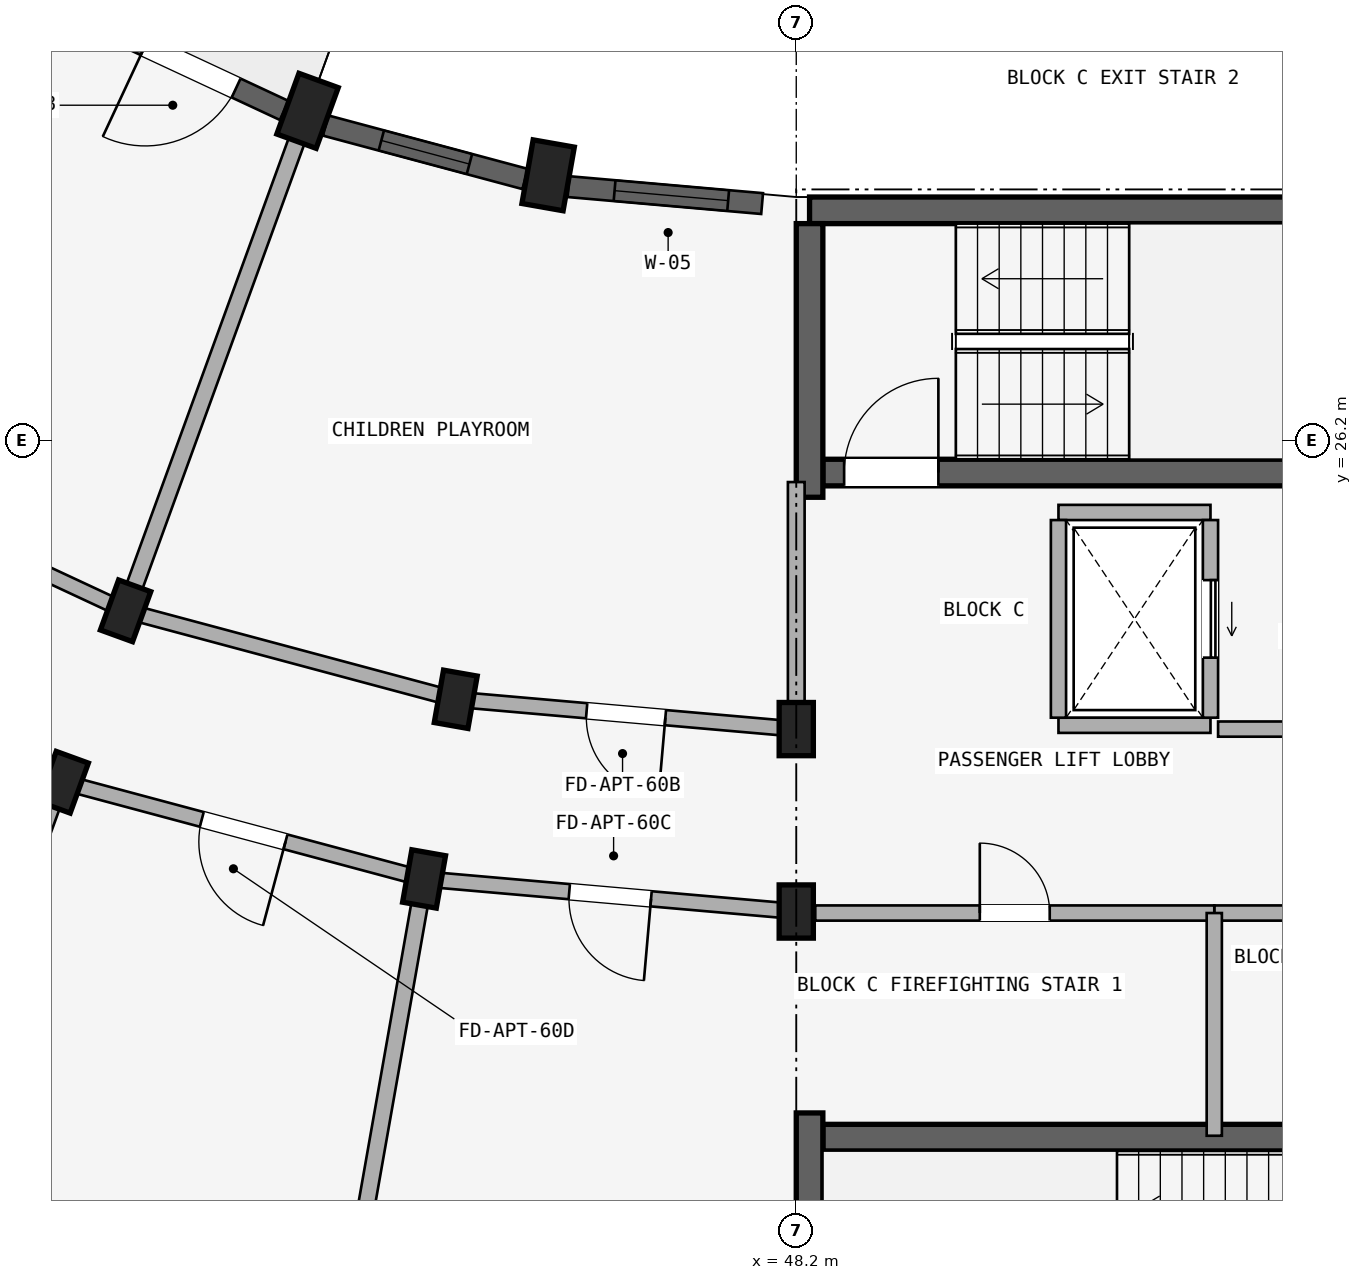
"""IFC4 building model, lengths in metres.
Left out: names, types, materials, properties, quantities, classifications, styles, units other than length and angle.
Written with IfcOpenShell. Run it as: python <this file> out.ifc"""

import sys

from ifc_helpers import new_model, si_unit, direction, frame, frame_2d, origin, origin_2d, place, context, subcontext, project, spatial, rectangle, extrude, element, fill, save


model = new_model("IFC4")
c1 = context("Model", 3, precision=1e-05, world=origin(), true_north=direction((0.0, 1.0)))
c2 = subcontext(c1, "Body", "Model", "MODEL_VIEW")
j1 = project(units=[si_unit("LENGTHUNIT", "METRE"), si_unit("PLANEANGLEUNIT", "RADIAN")], contexts=[c1])
p1 = place(None, origin())
s1 = spatial("IfcSite", under=j1, at=p1, CompositionType="ELEMENT")
p2 = place(p1, origin())
s2 = spatial("IfcBuilding", under=s1, at=p2, CompositionType="ELEMENT")
p3 = place(p2, frame((0.0, 0.0, 15.0)))
s3 = spatial("IfcBuildingStorey", under=s2, at=p3, CompositionType="ELEMENT", Elevation=15.0)
p4 = place(p3, frame((48.55, 17.025, 0.0), z_axis=(0.0, 0.0, 1.0), x_axis=(1.0, 0.0, 0.0)))
e1 = element("IfcWall", 1, at=p4, inside=s3, PredefinedType="SHEAR", context=c2, shape_type="SweptSolid", body=[
    extrude(rectangle(XDim=8.075, YDim=0.35, at=frame_2d((4.038, 0.0))), origin(), (0.0, 0.0, 1.0), 2.93),
])
p5 = place(p4, frame((6.38, 0.0, 0.0)))
e2 = element("IfcOpeningElement", 2, at=p5, cuts=e1, PredefinedType="OPENING", context=c2, shape_type="SweptSolid", body=[
    extrude(rectangle(XDim=1.24, YDim=2.15, at=frame_2d((0.62, 1.075))), frame((0.0, 0.185, 0.0), z_axis=(0.0, -1.0, 0.0), x_axis=(1.0, 0.0, 0.0)), (0.0, 0.0, 1.0), 0.37),
])
p6 = place(p3, frame((48.375, 17.35, 0.0), z_axis=(0.0, 0.0, 1.0), x_axis=(0.0, -1.0, 0.0)))
e3 = element("IfcWall", 3, at=p6, inside=s3, PredefinedType="SHEAR", context=c2, shape_type="SweptSolid", body=[
    extrude(rectangle(XDim=3.6, YDim=0.35, at=frame_2d((1.8, 0.0))), origin(), (0.0, 0.0, 1.0), 2.93),
])
p7 = place(p3, frame((48.375, 29.225, 0.0), z_axis=(0.0, 0.0, 1.0), x_axis=(1.0, 0.0, 0.0)))
e4 = element("IfcWall", 4, at=p7, inside=s3, PredefinedType="SHEAR", context=c2, shape_type="SweptSolid", body=[
    extrude(rectangle(XDim=8.25, YDim=0.35, at=frame_2d((4.125, 0.0))), origin(), (0.0, 0.0, 1.0), 2.93),
])
p8 = place(p3, frame((48.55, 25.775, 0.0), z_axis=(0.0, 0.0, 1.0), x_axis=(1.0, 0.0, 0.0)))
e5 = element("IfcWall", 5, at=p8, inside=s3, PredefinedType="SHEAR", context=c2, shape_type="SweptSolid", body=[
    extrude(rectangle(XDim=7.9, YDim=0.35, at=frame_2d((3.95, 0.0))), origin(), (0.0, 0.0, 1.0), 2.93),
])
p9 = place(p8, frame((0.28, 0.0, 0.0)))
e6 = element("IfcOpeningElement", 6, at=p9, cuts=e5, PredefinedType="OPENING", context=c2, shape_type="SweptSolid", body=[
    extrude(rectangle(XDim=1.24, YDim=2.15, at=frame_2d((0.62, 1.075))), frame((0.0, 0.185, 0.0), z_axis=(0.0, -1.0, 0.0), x_axis=(1.0, 0.0, 0.0)), (0.0, 0.0, 1.0), 0.37),
])
p10 = place(p3, frame((48.375, 29.05, 0.0), z_axis=(0.0, 0.0, 1.0), x_axis=(0.0, -1.0, 0.0)))
e7 = element("IfcWall", 7, at=p10, inside=s3, PredefinedType="SHEAR", context=c2, shape_type="SweptSolid", body=[
    extrude(rectangle(XDim=3.6, YDim=0.35, at=frame_2d((1.8, 0.0))), origin(), (0.0, 0.0, 1.0), 2.93),
])
for number, where, z_axis, x_axis in (
    (8, (48.2, 22.4, 0.0), (0.0, 0.0, 1.0), (1.0, 0.0, 0.0)),
    (9, (48.2, 20.0, 0.0), (0.0, 0.0, 1.0), (1.0, 0.0, 0.0)),
):
    element("IfcColumn", number, at=place(p3, frame(where, z_axis=z_axis, x_axis=x_axis)), inside=s3, PredefinedType="COLUMN", context=c2, shape_type="SweptSolid", body=[
        extrude(rectangle(XDim=0.45, YDim=0.7, at=origin_2d()), origin(), (0.0, 0.0, 1.0), 2.93),
    ])
p11 = place(p3, frame((44.935, 29.686, 0.0), z_axis=(0.0, 0.0, 1.0), x_axis=(-0.984807753012, 0.173648177667, 0.0)))
e10 = element("IfcColumn", 10, at=p11, inside=s3, PredefinedType="COLUMN", context=c2, shape_type="SweptSolid", body=[
    extrude(rectangle(XDim=0.55, YDim=0.85, at=origin_2d()), origin(), (0.0, 0.0, 1.0), 2.93),
])
for number, where, z_axis, x_axis in (
    (11, (43.72, 22.792, 0.0), (0.0, 0.0, 1.0), (-0.985, 0.174, 0.0)),
    (12, (43.303, 20.428, 0.0), (0.0, 0.0, 1.0), (-0.985, 0.174, 0.0)),
):
    element("IfcColumn", number, at=place(p3, frame(where, z_axis=z_axis, x_axis=x_axis)), inside=s3, PredefinedType="COLUMN", context=c2, shape_type="SweptSolid", body=[
        extrude(rectangle(XDim=0.45, YDim=0.7, at=origin_2d()), origin(), (0.0, 0.0, 1.0), 2.93),
    ])
p12 = place(p3, frame((41.77, 30.534, 0.0), z_axis=(0.0, 0.0, 1.0), x_axis=(-0.939692620786, 0.342020143326, 0.0)))
e13 = element("IfcColumn", 13, at=p12, inside=s3, PredefinedType="COLUMN", context=c2, shape_type="SweptSolid", body=[
    extrude(rectangle(XDim=0.55, YDim=0.85, at=origin_2d()), origin(), (0.0, 0.0, 1.0), 2.93),
])
for number, where, z_axis, x_axis in (
    (14, (39.376, 23.956, 0.0), (0.0, 0.0, 1.0), (-0.94, 0.342, 0.0)),
    (15, (38.555, 21.701, 0.0), (0.0, 0.0, 1.0), (-0.94, 0.342, 0.0)),
):
    element("IfcColumn", number, at=place(p3, frame(where, z_axis=z_axis, x_axis=x_axis)), inside=s3, PredefinedType="COLUMN", context=c2, shape_type="SweptSolid", body=[
        extrude(rectangle(XDim=0.45, YDim=0.7, at=origin_2d()), origin(), (0.0, 0.0, 1.0), 2.93),
    ])
p13 = place(p3, frame((53.7, 19.98, 0.0), z_axis=(0.0, 0.0, 1.0), x_axis=(1.0, 0.0, 0.0)))
e16 = element("IfcWall", 16, at=p13, inside=s3, PredefinedType="STANDARD", context=c2, shape_type="SweptSolid", body=[
    extrude(rectangle(XDim=5.65, YDim=0.2, at=frame_2d((2.825, 0.0))), origin(), (0.0, 0.0, 1.0), 2.372),
])
p14 = place(p13, frame((1.923, 0.0, 0.0)))
e17 = element("IfcOpeningElement", 17, at=p14, cuts=e16, PredefinedType="OPENING", context=c2, shape_type="SweptSolid", body=[
    extrude(rectangle(XDim=1.24, YDim=2.15, at=frame_2d((0.62, 1.075))), frame((0.0, 0.11, 0.0), z_axis=(0.0, -1.0, 0.0), x_axis=(1.0, 0.0, 0.0)), (0.0, 0.0, 1.0), 0.22),
])
p15 = place(p3, frame((48.45, 19.98, 0.0), z_axis=(0.0, 0.0, 1.0), x_axis=(1.0, 0.0, 0.0)))
e18 = element("IfcWall", 18, at=p15, inside=s3, PredefinedType="STANDARD", context=c2, shape_type="SweptSolid", body=[
    extrude(rectangle(XDim=5.25, YDim=0.2, at=frame_2d((2.625, 0.0))), origin(), (0.0, 0.0, 1.0), 2.372),
])
p16 = place(p15, frame((2.165, 0.0, 0.0)))
e19 = element("IfcOpeningElement", 19, at=p16, cuts=e18, PredefinedType="OPENING", context=c2, shape_type="SweptSolid", body=[
    extrude(rectangle(XDim=0.92, YDim=2.1, at=frame_2d((0.46, 1.05))), frame((0.0, 0.11, 0.0), z_axis=(0.0, -1.0, 0.0), x_axis=(1.0, 0.0, 0.0)), (0.0, 0.0, 1.0), 0.22),
])
p17 = place(p3, frame((53.7, 19.98, 0.0), z_axis=(0.0, 0.0, 1.0), x_axis=(0.0, -1.0, 0.0)))
e20 = element("IfcWall", 20, at=p17, inside=s3, PredefinedType="STANDARD", context=c2, shape_type="SweptSolid", body=[
    extrude(rectangle(XDim=2.93, YDim=0.2, at=frame_2d((1.465, 0.0))), origin(), (0.0, 0.0, 1.0), 2.372),
])
p18 = place(p3, frame((51.65, 25.25, 0.0), z_axis=(0.0, 0.0, 1.0), x_axis=(1.0, 0.0, 0.0)))
e21 = element("IfcWall", 21, at=p18, inside=s3, PredefinedType="STANDARD", context=c2, shape_type="SweptSolid", body=[
    extrude(rectangle(XDim=2.0, YDim=0.2, at=frame_2d((1.0, 0.0))), origin(), (0.0, 0.0, 1.0), 2.93),
])
p19 = place(p3, frame((51.65, 22.45, 0.0), z_axis=(0.0, 0.0, 1.0), x_axis=(1.0, 0.0, 0.0)))
e22 = element("IfcWall", 22, at=p19, inside=s3, PredefinedType="STANDARD", context=c2, shape_type="SweptSolid", body=[
    extrude(rectangle(XDim=2.0, YDim=0.2, at=frame_2d((1.0, 0.0))), origin(), (0.0, 0.0, 1.0), 2.372),
])
p20 = place(p3, frame((51.65, 25.15, 0.0), z_axis=(0.0, 0.0, 1.0), x_axis=(0.0, -1.0, 0.0)))
e23 = element("IfcWall", 23, at=p20, inside=s3, PredefinedType="STANDARD", context=c2, shape_type="SweptSolid", body=[
    extrude(rectangle(XDim=2.6, YDim=0.2, at=frame_2d((1.3, 0.0))), origin(), (0.0, 0.0, 1.0), 2.372),
])
p21 = place(p3, frame((53.65, 25.15, 0.0), z_axis=(0.0, 0.0, 1.0), x_axis=(0.0, -1.0, 0.0)))
e24 = element("IfcWall", 24, at=p21, inside=s3, PredefinedType="STANDARD", context=c2, shape_type="SweptSolid", body=[
    extrude(rectangle(XDim=2.6, YDim=0.2, at=frame_2d((1.3, 0.0))), origin(), (0.0, 0.0, 1.0), 2.372),
])
p22 = place(p21, frame((0.79, 0.0, 0.0)))
e25 = element("IfcOpeningElement", 25, at=p22, cuts=e24, PredefinedType="OPENING", context=c2, shape_type="SweptSolid", body=[
    extrude(rectangle(XDim=1.02, YDim=2.15, at=frame_2d((0.51, 1.075))), frame((0.0, 0.11, 0.0), z_axis=(0.0, -1.0, 0.0), x_axis=(1.0, 0.0, 0.0)), (0.0, 0.0, 1.0), 0.22),
])
p23 = place(p3, frame((53.75, 22.4, 0.0), z_axis=(0.0, 0.0, 1.0), x_axis=(1.0, 0.0, 0.0)))
e26 = element("IfcWall", 26, at=p23, inside=s3, PredefinedType="STANDARD", context=c2, shape_type="SweptSolid", body=[
    extrude(rectangle(XDim=5.6, YDim=0.2, at=frame_2d((2.8, 0.0))), origin(), (0.0, 0.0, 1.0), 2.372),
])
p24 = place(p23, frame((1.91, 0.0, 0.0)))
e27 = element("IfcOpeningElement", 27, at=p24, cuts=e26, PredefinedType="OPENING", context=c2, shape_type="SweptSolid", body=[
    extrude(rectangle(XDim=1.22, YDim=2.15, at=frame_2d((0.61, 1.075))), frame((0.0, 0.11, 0.0), z_axis=(0.0, -1.0, 0.0), x_axis=(1.0, 0.0, 0.0)), (0.0, 0.0, 1.0), 0.22),
])
p25 = place(p3, frame((48.2, 22.4, 0.0), z_axis=(0.0, 0.0, 1.0), x_axis=(-0.996191949488, 0.087187153726, 0.0)))
e28 = element("IfcWall", 28, at=p25, inside=s3, PredefinedType="STANDARD", context=c2, shape_type="SweptSolid", body=[
    extrude(rectangle(XDim=4.497, YDim=0.2, at=frame_2d((2.249, 0.0))), origin(), (0.0, 0.0, 1.0), 2.372),
])
p26 = place(p25, frame((1.729, 0.0, 0.0)))
e29 = element("IfcOpeningElement", 29, at=p26, cuts=e28, PredefinedType="OPENING", context=c2, shape_type="SweptSolid", body=[
    extrude(rectangle(XDim=1.04, YDim=2.15, at=frame_2d((0.52, 1.075))), frame((0.0, 0.11, 0.0), z_axis=(0.0, -1.0, 0.0), x_axis=(1.0, 0.0, 0.0)), (0.0, 0.0, 1.0), 0.22),
])
p27 = place(p3, frame((48.2, 20.0, 0.0), z_axis=(0.0, 0.0, 1.0), x_axis=(-0.996193663584, 0.087167566415, 0.0)))
e30 = element("IfcWall", 30, at=p27, inside=s3, PredefinedType="STANDARD", context=c2, shape_type="SweptSolid", body=[
    extrude(rectangle(XDim=4.916, YDim=0.2, at=frame_2d((2.458, 0.0))), origin(), (0.0, 0.0, 1.0), 2.372),
])
p28 = place(p27, frame((1.918, 0.0, 0.0)))
e31 = element("IfcOpeningElement", 31, at=p28, cuts=e30, PredefinedType="OPENING", context=c2, shape_type="SweptSolid", body=[
    extrude(rectangle(XDim=1.08, YDim=2.15, at=frame_2d((0.54, 1.075))), frame((0.0, 0.11, 0.0), z_axis=(0.0, -1.0, 0.0), x_axis=(1.0, 0.0, 0.0)), (0.0, 0.0, 1.0), 0.22),
])
p29 = place(p3, frame((43.72, 22.792, 0.0), z_axis=(0.0, 0.0, 1.0), x_axis=(-0.965934240054, 0.258787642463, 0.0)))
e32 = element("IfcWall", 32, at=p29, inside=s3, PredefinedType="STANDARD", context=c2, shape_type="SweptSolid", body=[
    extrude(rectangle(XDim=4.497, YDim=0.2, at=frame_2d((2.249, 0.0))), origin(), (0.0, 0.0, 1.0), 2.372),
])
p30 = place(p3, frame((43.303, 20.428, 0.0), z_axis=(0.0, 0.0, 1.0), x_axis=(-0.965930095386, 0.258803112091, 0.0)))
e33 = element("IfcWall", 33, at=p30, inside=s3, PredefinedType="STANDARD", context=c2, shape_type="SweptSolid", body=[
    extrude(rectangle(XDim=4.916, YDim=0.2, at=frame_2d((2.458, 0.0))), origin(), (0.0, 0.0, 1.0), 2.372),
])
p31 = place(p30, frame((1.888, 0.0, 0.0)))
e34 = element("IfcOpeningElement", 34, at=p31, cuts=e33, PredefinedType="OPENING", context=c2, shape_type="SweptSolid", body=[
    extrude(rectangle(XDim=1.14, YDim=2.15, at=frame_2d((0.57, 1.075))), frame((0.0, 0.11, 0.0), z_axis=(0.0, -1.0, 0.0), x_axis=(1.0, 0.0, 0.0)), (0.0, 0.0, 1.0), 0.22),
])
p32 = place(p3, frame((39.376, 23.956, 0.0), z_axis=(0.0, 0.0, 1.0), x_axis=(-0.906307919131, 0.422617978463, 0.0)))
e35 = element("IfcWall", 35, at=p32, inside=s3, PredefinedType="STANDARD", context=c2, shape_type="SweptSolid", body=[
    extrude(rectangle(XDim=4.497, YDim=0.2, at=frame_2d((2.249, 0.0))), origin(), (0.0, 0.0, 1.0), 2.372),
])
p33 = place(p32, frame((1.709, 0.0, 0.0)))
e36 = element("IfcOpeningElement", 36, at=p33, cuts=e35, PredefinedType="OPENING", context=c2, shape_type="SweptSolid", body=[
    extrude(rectangle(XDim=1.08, YDim=2.15, at=frame_2d((0.54, 1.075))), frame((0.0, 0.11, 0.0), z_axis=(0.0, -1.0, 0.0), x_axis=(1.0, 0.0, 0.0)), (0.0, 0.0, 1.0), 0.22),
])
p34 = place(p3, frame((38.555, 21.701, 0.0), z_axis=(0.0, 0.0, 1.0), x_axis=(-0.906302381024, 0.422629854778, 0.0)))
e37 = element("IfcWall", 37, at=p34, inside=s3, PredefinedType="STANDARD", context=c2, shape_type="SweptSolid", body=[
    extrude(rectangle(XDim=4.915, YDim=0.2, at=frame_2d((2.458, 0.0))), origin(), (0.0, 0.0, 1.0), 2.372),
])
p35 = place(p3, frame((48.2, 25.65, 0.0), z_axis=(0.0, 0.0, 1.0), x_axis=(0.0, -1.0, 0.0)))
e38 = element("IfcWall", 38, at=p35, inside=s3, PredefinedType="STANDARD", context=c2, shape_type="SweptSolid", body=[
    extrude(rectangle(XDim=3.2, YDim=0.22, at=frame_2d((1.6, 0.0))), origin(), (0.0, 0.0, 1.0), 2.372),
])
p36 = place(p3, frame((43.286, 20.33, 0.0), z_axis=(0.0, 0.0, 1.0), x_axis=(-0.173646216546, -0.984808098809, 0.0)))
e39 = element("IfcWall", 39, at=p36, inside=s3, PredefinedType="STANDARD", context=c2, shape_type="SweptSolid", body=[
    extrude(rectangle(XDim=17.42, YDim=0.22, at=frame_2d((8.71, 0.0))), origin(), (0.0, 0.0, 1.0), 2.372),
])
p37 = place(p3, frame((41.702, 30.346, 0.0), z_axis=(0.0, 0.0, 1.0), x_axis=(-0.342010221662, -0.939696231917, 0.0)))
e40 = element("IfcWall", 40, at=p37, inside=s3, PredefinedType="STANDARD", context=c2, shape_type="SweptSolid", body=[
    extrude(rectangle(XDim=6.75, YDim=0.22, at=frame_2d((3.375, 0.0))), origin(), (0.0, 0.0, 1.0), 2.372),
])
p38 = place(p3, frame((38.521, 21.607, 0.0), z_axis=(0.0, 0.0, 1.0), x_axis=(-0.342022120477, -0.939691901159, 0.0)))
e41 = element("IfcWall", 41, at=p38, inside=s3, PredefinedType="PARTITIONING", context=c2, shape_type="SweptSolid", body=[
    extrude(rectangle(XDim=17.42, YDim=0.15, at=frame_2d((8.71, 0.0))), origin(), (0.0, 0.0, 1.0), 2.372),
])
p39 = place(p38, frame((7.5, 0.0, 0.0)))
e42 = element("IfcOpeningElement", 42, at=p39, cuts=e41, PredefinedType="OPENING", context=c2, shape_type="SweptSolid", body=[
    extrude(rectangle(XDim=0.8, YDim=2.1, at=frame_2d((0.4, 1.05))), frame((0.0, 0.085, 0.0), z_axis=(0.0, -1.0, 0.0), x_axis=(1.0, 0.0, 0.0)), (0.0, 0.0, 1.0), 0.17),
])
p40 = place(p3, frame((47.751, 29.314, 0.0), z_axis=(0.0, 0.0, 1.0), x_axis=(-0.996194235595, 0.08716102895, 0.0)))
e43 = element("IfcWall", 43, at=p40, inside=s3, PredefinedType="STANDARD", context=c2, shape_type="SweptSolid", body=[
    extrude(rectangle(XDim=2.557, YDim=0.275, at=frame_2d((1.279, 0.0))), origin(), (0.0, 0.0, 1.0), 2.472),
])
p41 = place(p40, frame((0.448, 0.0, 0.622)))
e44 = element("IfcOpeningElement", 44, at=p41, cuts=e43, PredefinedType="OPENING", context=c2, shape_type="SweptSolid", body=[
    extrude(rectangle(XDim=1.5, YDim=1.65, at=frame_2d((0.75, 0.825))), frame((0.0, 0.147, 0.0), z_axis=(0.0, -1.0, 0.0), x_axis=(1.0, 0.0, 0.0)), (0.0, 0.0, 1.0), 0.295),
])
p42 = place(p3, frame((44.633, 29.637, 0.0), z_axis=(0.0, 0.0, 1.0), x_axis=(-0.965925595341, 0.258819907011, 0.0)))
e45 = element("IfcWall", 45, at=p42, inside=s3, PredefinedType="STANDARD", context=c2, shape_type="SweptSolid", body=[
    extrude(rectangle(XDim=2.718, YDim=0.275, at=frame_2d((1.359, 0.0))), origin(), (0.0, 0.0, 1.0), 2.472),
])
p43 = place(p42, frame((0.759, 0.0, 0.772)))
e46 = element("IfcOpeningElement", 46, at=p43, cuts=e45, PredefinedType="OPENING", context=c2, shape_type="SweptSolid", body=[
    extrude(rectangle(XDim=1.2, YDim=1.5, at=frame_2d((0.6, 0.75))), frame((0.0, 0.147, 0.0), z_axis=(0.0, -1.0, 0.0), x_axis=(1.0, 0.0, 0.0)), (0.0, 0.0, 1.0), 0.295),
])
p44 = place(p3, frame((41.464, 30.539, 0.0), z_axis=(0.0, 0.0, 1.0), x_axis=(-0.906311629168, 0.422610022166, 0.0)))
e47 = element("IfcWall", 47, at=p44, inside=s3, PredefinedType="STANDARD", context=c2, shape_type="SweptSolid", body=[
    extrude(rectangle(XDim=2.718, YDim=0.275, at=frame_2d((1.359, 0.0))), origin(), (0.0, 0.0, 1.0), 2.472),
])
p45 = place(p44, frame((0.699, 0.0, 0.0)))
e48 = element("IfcOpeningElement", 48, at=p45, cuts=e47, PredefinedType="OPENING", context=c2, shape_type="SweptSolid", body=[
    extrude(rectangle(XDim=1.32, YDim=2.15, at=frame_2d((0.66, 1.075))), frame((0.0, 0.147, 0.0), z_axis=(0.0, -1.0, 0.0), x_axis=(1.0, 0.0, 0.0)), (0.0, 0.0, 1.0), 0.295),
])
p46 = place(p41, origin())
e49 = element("IfcWindow", 49, at=p46, inside=s3, PartitioningType="DOUBLE_PANEL_VERTICAL", PredefinedType="WINDOW", context=c2, shape_type="SweptSolid", body=[
    extrude(rectangle(XDim=1.5, YDim=1.65, at=frame_2d((0.75, 0.825))), frame((0.0, 0.03, 0.0), z_axis=(0.0, -1.0, 0.0), x_axis=(1.0, 0.0, 0.0)), (0.0, 0.0, 1.0), 0.06),
])
fill(e44, e49)
p47 = place(p43, origin())
e50 = element("IfcWindow", 50, at=p47, inside=s3, PartitioningType="SINGLE_PANEL", PredefinedType="WINDOW", context=c2, shape_type="SweptSolid", body=[
    extrude(rectangle(XDim=1.2, YDim=1.5, at=frame_2d((0.6, 0.75))), frame((0.0, 0.03, 0.0), z_axis=(0.0, -1.0, 0.0), x_axis=(1.0, 0.0, 0.0)), (0.0, 0.0, 1.0), 0.06),
])
fill(e46, e50)
p48 = place(p16, origin())
e51 = element("IfcDoor", 51, at=p48, inside=s3, OperationType="SINGLE_SWING_LEFT", PredefinedType="DOOR", context=c2, shape_type="SweptSolid", body=[
    extrude(rectangle(XDim=0.92, YDim=2.1, at=frame_2d((0.46, 1.05))), frame((0.0, 0.025, 0.0), z_axis=(0.0, -1.0, 0.0), x_axis=(1.0, 0.0, 0.0)), (0.0, 0.0, 1.0), 0.05),
])
fill(e19, e51)
p49 = place(p9, origin())
e52 = element("IfcDoor", 52, at=p49, inside=s3, OperationType="SINGLE_SWING_RIGHT", PredefinedType="DOOR", context=c2, shape_type="SweptSolid", body=[
    extrude(rectangle(XDim=1.24, YDim=2.15, at=frame_2d((0.62, 1.075))), frame((0.0, 0.025, 0.0), z_axis=(0.0, -1.0, 0.0), x_axis=(1.0, 0.0, 0.0)), (0.0, 0.0, 1.0), 0.05),
])
fill(e6, e52)
p50 = place(p22, origin())
e53 = element("IfcDoor", 53, at=p50, inside=s3, OperationType="SLIDING_TO_RIGHT", PredefinedType="DOOR", context=c2, shape_type="SweptSolid", body=[
    extrude(rectangle(XDim=1.02, YDim=2.15, at=frame_2d((0.51, 1.075))), frame((0.0, 0.025, 0.0), z_axis=(0.0, -1.0, 0.0), x_axis=(1.0, 0.0, 0.0)), (0.0, 0.0, 1.0), 0.05),
])
fill(e25, e53)
p51 = place(p28, origin())
e54 = element("IfcDoor", 54, at=p51, inside=s3, OperationType="SINGLE_SWING_LEFT", PredefinedType="DOOR", context=c2, shape_type="SweptSolid", body=[
    extrude(rectangle(XDim=1.08, YDim=2.15, at=frame_2d((0.54, 1.075))), frame((0.0, 0.025, 0.0), z_axis=(0.0, -1.0, 0.0), x_axis=(1.0, 0.0, 0.0)), (0.0, 0.0, 1.0), 0.05),
])
fill(e31, e54)
p52 = place(p31, frame((1.14, 0.0, 0.0), z_axis=(0.0, 0.0, 1.0), x_axis=(-1.0, 0.0, 0.0)))
e55 = element("IfcDoor", 55, at=p52, inside=s3, OperationType="SINGLE_SWING_RIGHT", PredefinedType="DOOR", context=c2, shape_type="SweptSolid", body=[
    extrude(rectangle(XDim=1.14, YDim=2.15, at=frame_2d((0.57, 1.075))), frame((0.0, 0.025, 0.0), z_axis=(0.0, -1.0, 0.0), x_axis=(1.0, 0.0, 0.0)), (0.0, 0.0, 1.0), 0.05),
])
fill(e34, e55)
p53 = place(p26, frame((1.04, 0.0, 0.0), z_axis=(0.0, 0.0, 1.0), x_axis=(-1.0, 0.0, 0.0)))
e56 = element("IfcDoor", 56, at=p53, inside=s3, OperationType="SINGLE_SWING_RIGHT", PredefinedType="DOOR", context=c2, shape_type="SweptSolid", body=[
    extrude(rectangle(XDim=1.04, YDim=2.15, at=frame_2d((0.52, 1.075))), frame((0.0, 0.025, 0.0), z_axis=(0.0, -1.0, 0.0), x_axis=(1.0, 0.0, 0.0)), (0.0, 0.0, 1.0), 0.05),
])
fill(e29, e56)
p54 = place(p45, frame((1.32, 0.0, 0.0), z_axis=(0.0, 0.0, 1.0), x_axis=(-1.0, 0.0, 0.0)))
e57 = element("IfcDoor", 57, at=p54, inside=s3, OperationType="SINGLE_SWING_LEFT", PredefinedType="DOOR", context=c2, shape_type="SweptSolid", body=[
    extrude(rectangle(XDim=1.32, YDim=2.15, at=frame_2d((0.66, 1.075))), frame((0.0, 0.025, 0.0), z_axis=(0.0, -1.0, 0.0), x_axis=(1.0, 0.0, 0.0)), (0.0, 0.0, 1.0), 0.05),
])
fill(e48, e57)
save(model, sys.argv[1])
